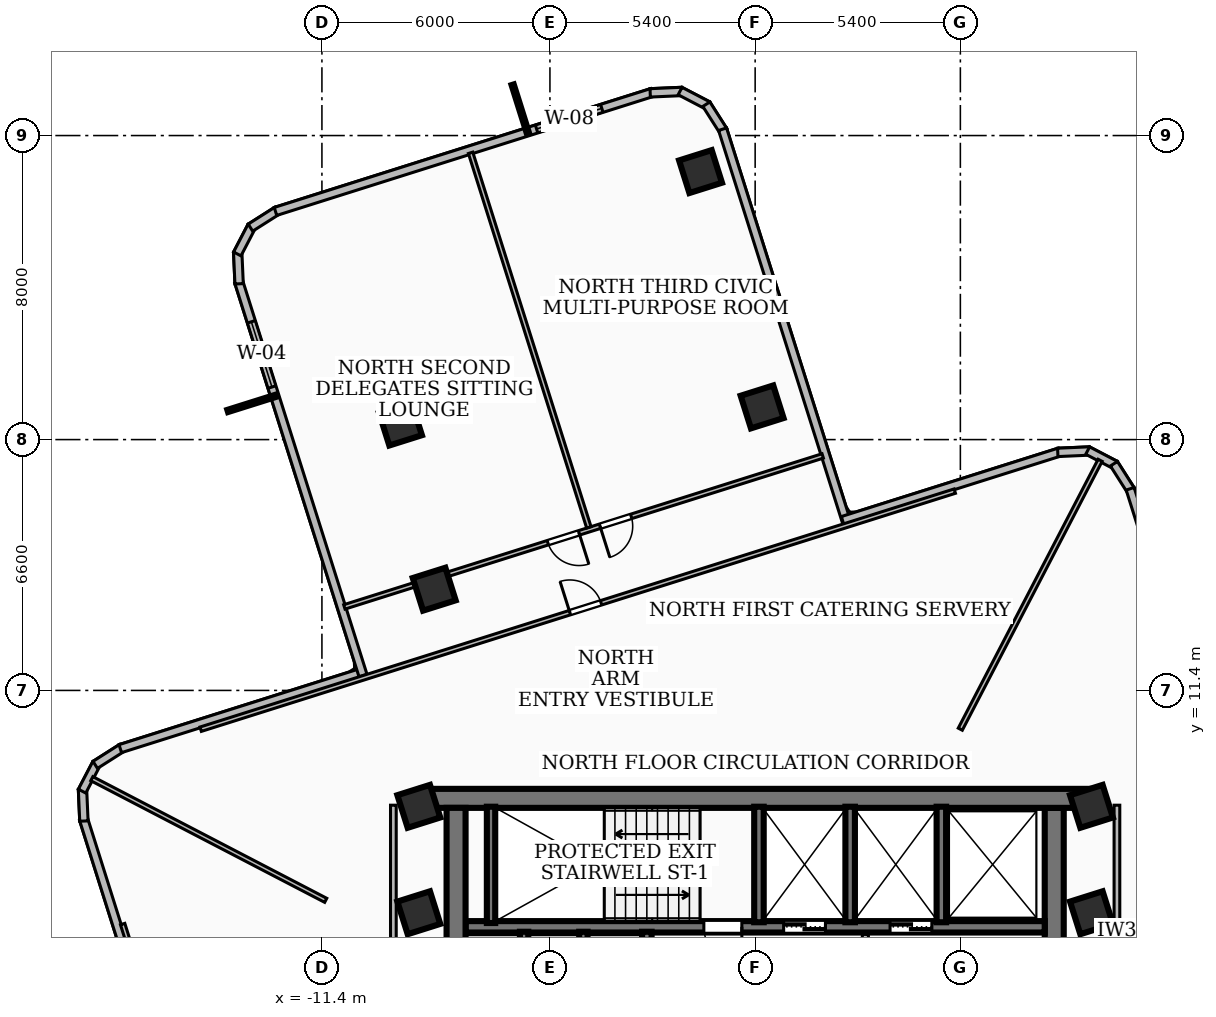
"""IFC4 building model, lengths in metres.
Left out: names, types, materials, properties, quantities, classifications, styles, units other than length and angle.
Written with IfcOpenShell. Run it as: python <this file> out.ifc"""

import sys

from ifc_helpers import new_model, si_unit, direction, frame, frame_2d, origin, origin_2d, place, context, subcontext, project, spatial, rectangle, extrude, element, fill, save


model = new_model("IFC4")
c1 = context("Model", 3, precision=1e-05, world=origin(), true_north=direction((0.0, 1.0)))
c2 = subcontext(c1, "Body", "Model", "MODEL_VIEW")
j1 = project(units=[si_unit("LENGTHUNIT", "METRE"), si_unit("PLANEANGLEUNIT", "RADIAN")], contexts=[c1])
p1 = place(None, origin())
s1 = spatial("IfcSite", under=j1, at=p1, CompositionType="ELEMENT")
p2 = place(p1, origin())
s2 = spatial("IfcBuilding", under=s1, at=p2, CompositionType="ELEMENT")
p3 = place(p2, frame((0.0, 0.0, 152.28)))
s3 = spatial("IfcBuildingStorey", under=s2, at=p3, CompositionType="ELEMENT", Elevation=152.28)
p4 = place(p3, frame((-8.78, 8.56, 0.0), z_axis=(0.0, 0.0, 1.0), x_axis=(1.0, 0.0, 0.0)))
e1 = element("IfcWall", 1, at=p4, inside=s3, PredefinedType="SHEAR", context=c2, shape_type="SweptSolid", body=[
    extrude(rectangle(XDim=17.56, YDim=0.5, at=frame_2d((8.78, 0.0))), origin(), (0.0, 0.0, 1.0), 3.34),
])
for number, where, z_axis, x_axis in (
    (2, (-7.87, 2.0, 0.0), (0.0, 0.0, 1.0), (0.0, 1.0, 0.0)),
    (3, (7.87, 8.31, 0.0), (0.0, 0.0, 1.0), (0.0, -1.0, 0.0)),
):
    element("IfcWall", number, at=place(p3, frame(where, z_axis=z_axis, x_axis=x_axis)), inside=s3, PredefinedType="SHEAR", context=c2, shape_type="SweptSolid", body=[
        extrude(rectangle(XDim=6.31, YDim=0.5, at=frame_2d((3.155, 0.0))), origin(), (0.0, 0.0, 1.0), 3.34),
    ])
p5 = place(p3, frame((7.62, 5.18, 0.0), z_axis=(0.0, 0.0, 1.0), x_axis=(-1.0, 0.0, 0.0)))
e4 = element("IfcWall", 4, at=p5, inside=s3, PredefinedType="SOLIDWALL", context=c2, shape_type="SweptSolid", body=[
    extrude(rectangle(XDim=15.24, YDim=0.3, at=frame_2d((7.62, 0.0))), origin(), (0.0, 0.0, 1.0), 3.34),
])
p6 = place(p5, frame((5.77, 0.0, 0.0)))
e5 = element("IfcOpeningElement", 5, at=p6, cuts=e4, PredefinedType="OPENING", context=c2, shape_type="SweptSolid", body=[
    extrude(rectangle(XDim=1.1, YDim=2.15, at=frame_2d((0.55, 1.075))), frame((0.0, 0.16, 0.0), z_axis=(0.0, -1.0, 0.0), x_axis=(1.0, 0.0, 0.0)), (0.0, 0.0, 1.0), 0.32),
])
p7 = place(p5, frame((2.97, 0.0, 0.0)))
e6 = element("IfcOpeningElement", 6, at=p7, cuts=e4, PredefinedType="OPENING", context=c2, shape_type="SweptSolid", body=[
    extrude(rectangle(XDim=1.1, YDim=2.15, at=frame_2d((0.55, 1.075))), frame((0.0, 0.16, 0.0), z_axis=(0.0, -1.0, 0.0), x_axis=(1.0, 0.0, 0.0)), (0.0, 0.0, 1.0), 0.32),
])
p8 = place(p5, frame((7.97, 0.0, 0.0)))
e7 = element("IfcOpeningElement", 7, at=p8, cuts=e4, PredefinedType="OPENING", context=c2, shape_type="SweptSolid", body=[
    extrude(rectangle(XDim=1.0, YDim=2.1, at=frame_2d((0.5, 1.05))), frame((0.0, 0.16, 0.0), z_axis=(0.0, -1.0, 0.0), x_axis=(1.0, 0.0, 0.0)), (0.0, 0.0, 1.0), 0.32),
])
p9 = place(p3, frame((-6.95, 5.28, 0.0), z_axis=(0.0, 0.0, 1.0), x_axis=(0.0, 1.0, 0.0)))
e8 = element("IfcWall", 8, at=p9, inside=s3, PredefinedType="SOLIDWALL", context=c2, shape_type="SweptSolid", body=[
    extrude(rectangle(XDim=3.06, YDim=0.22, at=frame_2d((1.53, 0.0))), origin(), (0.0, 0.0, 1.0), 3.34),
])
for number, where, z_axis, x_axis in (
    (9, (0.1, 5.3, 0.0), (0.0, 0.0, 1.0), (0.0, 1.0, 0.0)),
    (10, (2.5, 5.3, 0.0), (0.0, 0.0, 1.0), (0.0, 1.0, 0.0)),
    (11, (4.9, 5.3, 0.0), (0.0, 0.0, 1.0), (0.0, 1.0, 0.0)),
):
    element("IfcWall", number, at=place(p3, frame(where, z_axis=z_axis, x_axis=x_axis)), inside=s3, PredefinedType="SOLIDWALL", context=c2, shape_type="SweptSolid", body=[
        extrude(rectangle(XDim=3.04, YDim=0.25, at=frame_2d((1.52, 0.0))), origin(), (0.0, 0.0, 1.0), 3.34),
    ])
p10 = place(p3, frame((-2.85, 1.98, 0.0), z_axis=(0.0, 0.0, 1.0), x_axis=(0.0, 1.0, 0.0)))
e12 = element("IfcWall", 12, at=p10, inside=s3, PredefinedType="SOLIDWALL", context=c2, shape_type="SweptSolid", body=[
    extrude(rectangle(XDim=3.07, YDim=0.25, at=frame_2d((1.535, 0.0))), origin(), (0.0, 0.0, 1.0), 3.34),
])
for number, where, z_axis, x_axis in (
    (13, (-6.08, 1.98, 0.0), (0.0, 0.0, 1.0), (0.0, 1.0, 0.0)),
    (14, (-4.52, 1.98, 0.0), (0.0, 0.0, 1.0), (0.0, 1.0, 0.0)),
):
    element("IfcWall", number, at=place(p3, frame(where, z_axis=z_axis, x_axis=x_axis)), inside=s3, PredefinedType="SOLIDWALL", context=c2, shape_type="SweptSolid", body=[
        extrude(rectangle(XDim=3.07, YDim=0.22, at=frame_2d((1.535, 0.0))), origin(), (0.0, 0.0, 1.0), 3.34),
    ])
for number, where, z_axis, x_axis in (
    (15, (-8.85, 5.55, 0.0), (0.0, 0.0, 1.0), (0.954, 0.301, 0.0)),
    (16, (8.85, 5.55, 0.0), (0.0, 0.0, 1.0), (0.954, 0.301, 0.0)),
    (17, (-8.85, 8.35, 0.0), (0.0, 0.0, 1.0), (0.954, 0.301, 0.0)),
    (18, (8.85, 8.35, 0.0), (0.0, 0.0, 1.0), (0.954, 0.301, 0.0)),
    (19, (0.183, 18.86, 0.0), (0.0, 0.0, 1.0), (0.954, 0.301, 0.0)),
    (20, (-8.445, 14.064, 0.0), (0.0, 0.0, 1.0), (0.954, 0.301, 0.0)),
    (21, (-1.437, 25.052, 0.0), (0.0, 0.0, 1.0), (0.954, 0.301, 0.0)),
    (22, (-9.333, 18.409, 0.0), (0.0, 0.0, 1.0), (0.954, 0.301, 0.0)),
):
    element("IfcColumn", number, at=place(p3, frame(where, z_axis=z_axis, x_axis=x_axis)), inside=s3, PredefinedType="COLUMN", context=c2, shape_type="SweptSolid", body=[
        extrude(rectangle(XDim=0.9, YDim=0.9, at=origin_2d()), origin(), (0.0, 0.0, 1.0), 3.6),
    ])
p11 = place(p3, frame((-15.87, 2.301, 0.0), z_axis=(0.0, 0.0, 1.0), x_axis=(-0.300910882413, 0.953652264112, 0.0)))
e23 = element("IfcWall", 23, at=p11, inside=s3, PredefinedType="SOLIDWALL", context=c2, shape_type="SweptSolid", body=[
    extrude(rectangle(XDim=5.989, YDim=0.22, at=frame_2d((2.994, 0.0))), origin(), (0.0, 0.0, 1.0), 3.34),
])
p12 = place(p3, frame((-17.663, 7.963, 0.0), z_axis=(0.0, 0.0, 1.0), x_axis=(-0.044147725226, 0.99902501388, 0.0)))
e24 = element("IfcWall", 24, at=p12, inside=s3, PredefinedType="SOLIDWALL", context=c2, shape_type="SweptSolid", body=[
    extrude(rectangle(XDim=0.835, YDim=0.22, at=frame_2d((0.417, 0.0))), origin(), (0.0, 0.0, 1.0), 3.34),
])
p13 = place(p3, frame((-17.711, 8.75, 0.0), z_axis=(0.0, 0.0, 1.0), x_axis=(0.462647505427, 0.886542320322, 0.0)))
e25 = element("IfcWall", 25, at=p13, inside=s3, PredefinedType="SOLIDWALL", context=c2, shape_type="SweptSolid", body=[
    extrude(rectangle(XDim=0.819, YDim=0.22, at=frame_2d((0.41, 0.0))), origin(), (0.0, 0.0, 1.0), 3.34),
])
p14 = place(p3, frame((-17.365, 9.441, 0.0), z_axis=(0.0, 0.0, 1.0), x_axis=(0.84369762364, 0.536818702975, 0.0)))
e26 = element("IfcWall", 26, at=p14, inside=s3, PredefinedType="SOLIDWALL", context=c2, shape_type="SweptSolid", body=[
    extrude(rectangle(XDim=0.834, YDim=0.22, at=frame_2d((0.417, 0.0))), origin(), (0.0, 0.0, 1.0), 3.34),
])
p15 = place(p3, frame((-16.706, 9.868, 0.0), z_axis=(0.0, 0.0, 1.0), x_axis=(0.953629605256, 0.300982683852, 0.0)))
e27 = element("IfcWall", 27, at=p15, inside=s3, PredefinedType="SOLIDWALL", context=c2, shape_type="SweptSolid", body=[
    extrude(rectangle(XDim=6.759, YDim=0.22, at=frame_2d((3.379, 0.0))), origin(), (0.0, 0.0, 1.0), 3.34),
])
p16 = place(p3, frame((-10.319, 11.792, 0.0), z_axis=(0.0, 0.0, 1.0), x_axis=(-0.301005479956, 0.953622410096, 0.0)))
e28 = element("IfcWall", 28, at=p16, inside=s3, PredefinedType="SOLIDWALL", context=c2, shape_type="SweptSolid", body=[
    extrude(rectangle(XDim=10.86, YDim=0.22, at=frame_2d((5.43, 0.0))), origin(), (0.0, 0.0, 1.0), 3.34),
])
p17 = place(p16, frame((7.96, 0.0, 0.85)))
e29 = element("IfcOpeningElement", 29, at=p17, cuts=e28, PredefinedType="OPENING", context=c2, shape_type="SweptSolid", body=[
    extrude(rectangle(XDim=1.8, YDim=2.0, at=frame_2d((0.9, 1.0))), frame((0.0, 0.12, 0.0), z_axis=(0.0, -1.0, 0.0), x_axis=(1.0, 0.0, 0.0)), (0.0, 0.0, 1.0), 0.24),
])
p18 = place(p3, frame((-13.579, 22.099, 0.0), z_axis=(0.0, 0.0, 1.0), x_axis=(-0.044225229981, 0.999021585869, 0.0)))
e30 = element("IfcWall", 30, at=p18, inside=s3, PredefinedType="SOLIDWALL", context=c2, shape_type="SweptSolid", body=[
    extrude(rectangle(XDim=0.833, YDim=0.22, at=frame_2d((0.417, 0.0))), origin(), (0.0, 0.0, 1.0), 3.34),
])
p19 = place(p3, frame((-13.627, 22.885, 0.0), z_axis=(0.0, 0.0, 1.0), x_axis=(0.462158884885, 0.886797138652, 0.0)))
e31 = element("IfcWall", 31, at=p19, inside=s3, PredefinedType="SOLIDWALL", context=c2, shape_type="SweptSolid", body=[
    extrude(rectangle(XDim=0.82, YDim=0.22, at=frame_2d((0.41, 0.0))), origin(), (0.0, 0.0, 1.0), 3.34),
])
p20 = place(p3, frame((-13.281, 23.577, 0.0), z_axis=(0.0, 0.0, 1.0), x_axis=(0.844227532803, 0.535984955812, 0.0)))
e32 = element("IfcWall", 32, at=p20, inside=s3, PredefinedType="SOLIDWALL", context=c2, shape_type="SweptSolid", body=[
    extrude(rectangle(XDim=0.834, YDim=0.22, at=frame_2d((0.417, 0.0))), origin(), (0.0, 0.0, 1.0), 3.34),
])
p21 = place(p3, frame((-12.622, 24.003, 0.0), z_axis=(0.0, 0.0, 1.0), x_axis=(0.953584440501, 0.301125745883, 0.0)))
e33 = element("IfcWall", 33, at=p21, inside=s3, PredefinedType="SOLIDWALL", context=c2, shape_type="SweptSolid", body=[
    extrude(rectangle(XDim=10.392, YDim=0.22, at=frame_2d((5.196, 0.0))), origin(), (0.0, 0.0, 1.0), 3.34),
])
p22 = place(p21, frame((7.205, 0.0, 0.85)))
e34 = element("IfcOpeningElement", 34, at=p22, cuts=e33, PredefinedType="OPENING", context=c2, shape_type="SweptSolid", body=[
    extrude(rectangle(XDim=1.8, YDim=1.8, at=frame_2d((0.9, 0.9))), frame((0.0, 0.12, 0.0), z_axis=(0.0, -1.0, 0.0), x_axis=(1.0, 0.0, 0.0)), (0.0, 0.0, 1.0), 0.24),
])
p23 = place(p3, frame((-2.762, 27.123, 0.0), z_axis=(0.0, 0.0, 1.0), x_axis=(0.999024443796, 0.044160623833, 0.0)))
e35 = element("IfcWall", 35, at=p23, inside=s3, PredefinedType="SOLIDWALL", context=c2, shape_type="SweptSolid", body=[
    extrude(rectangle(XDim=0.835, YDim=0.22, at=frame_2d((0.417, 0.0))), origin(), (0.0, 0.0, 1.0), 3.34),
])
p24 = place(p3, frame((-1.975, 27.171, 0.0), z_axis=(0.0, 0.0, 1.0), x_axis=(0.886542320322, -0.462647505427, 0.0)))
e36 = element("IfcWall", 36, at=p24, inside=s3, PredefinedType="SOLIDWALL", context=c2, shape_type="SweptSolid", body=[
    extrude(rectangle(XDim=0.819, YDim=0.22, at=frame_2d((0.41, 0.0))), origin(), (0.0, 0.0, 1.0), 3.34),
])
p25 = place(p3, frame((-1.284, 26.825, 0.0), z_axis=(0.0, 0.0, 1.0), x_axis=(0.537481840432, -0.843275323489, 0.0)))
e37 = element("IfcWall", 37, at=p25, inside=s3, PredefinedType="SOLIDWALL", context=c2, shape_type="SweptSolid", body=[
    extrude(rectangle(XDim=0.833, YDim=0.22, at=frame_2d((0.417, 0.0))), origin(), (0.0, 0.0, 1.0), 3.34),
])
p26 = place(p3, frame((-0.857, 26.167, 0.0), z_axis=(0.0, 0.0, 1.0), x_axis=(0.300949507539, -0.953640075664, 0.0)))
e38 = element("IfcWall", 38, at=p26, inside=s3, PredefinedType="SOLIDWALL", context=c2, shape_type="SweptSolid", body=[
    extrude(rectangle(XDim=10.858, YDim=0.22, at=frame_2d((5.429, 0.0))), origin(), (0.0, 0.0, 1.0), 2.152),
])
p27 = place(p3, frame((2.301, 15.87, 0.0), z_axis=(0.0, 0.0, 1.0), x_axis=(0.953652264112, 0.300910882413, 0.0)))
e39 = element("IfcWall", 39, at=p27, inside=s3, PredefinedType="SOLIDWALL", context=c2, shape_type="SweptSolid", body=[
    extrude(rectangle(XDim=5.989, YDim=0.22, at=frame_2d((2.994, 0.0))), origin(), (0.0, 0.0, 1.0), 2.152),
])
p28 = place(p3, frame((7.963, 17.663, 0.0), z_axis=(0.0, 0.0, 1.0), x_axis=(0.99902501388, 0.044147725226, 0.0)))
e40 = element("IfcWall", 40, at=p28, inside=s3, PredefinedType="SOLIDWALL", context=c2, shape_type="SweptSolid", body=[
    extrude(rectangle(XDim=0.835, YDim=0.22, at=frame_2d((0.417, 0.0))), origin(), (0.0, 0.0, 1.0), 3.34),
])
p29 = place(p3, frame((8.75, 17.711, 0.0), z_axis=(0.0, 0.0, 1.0), x_axis=(0.886542320322, -0.462647505427, 0.0)))
e41 = element("IfcWall", 41, at=p29, inside=s3, PredefinedType="SOLIDWALL", context=c2, shape_type="SweptSolid", body=[
    extrude(rectangle(XDim=0.819, YDim=0.22, at=frame_2d((0.41, 0.0))), origin(), (0.0, 0.0, 1.0), 3.34),
])
p30 = place(p3, frame((9.441, 17.365, 0.0), z_axis=(0.0, 0.0, 1.0), x_axis=(0.536818702975, -0.84369762364, 0.0)))
e42 = element("IfcWall", 42, at=p30, inside=s3, PredefinedType="SOLIDWALL", context=c2, shape_type="SweptSolid", body=[
    extrude(rectangle(XDim=0.834, YDim=0.22, at=frame_2d((0.417, 0.0))), origin(), (0.0, 0.0, 1.0), 3.34),
])
p31 = place(p3, frame((9.868, 16.706, 0.0), z_axis=(0.0, 0.0, 1.0), x_axis=(0.300982683852, -0.953629605256, 0.0)))
e43 = element("IfcWall", 43, at=p31, inside=s3, PredefinedType="SOLIDWALL", context=c2, shape_type="SweptSolid", body=[
    extrude(rectangle(XDim=6.759, YDim=0.22, at=frame_2d((3.379, 0.0))), origin(), (0.0, 0.0, 1.0), 2.152),
])
p32 = place(p3, frame((2.9, 2.04, 0.0), z_axis=(0.0, 0.0, 1.0), x_axis=(0.0, 1.0, 0.0)))
e44 = element("IfcWall", 44, at=p32, inside=s3, PredefinedType="PARTITIONING", context=c2, shape_type="SweptSolid", body=[
    extrude(rectangle(XDim=2.94, YDim=0.16, at=frame_2d((1.47, 0.0))), origin(), (0.0, 0.0, 1.0), 2.57),
])
p33 = place(p32, frame((1.82, 0.0, 0.0)))
e45 = element("IfcOpeningElement", 45, at=p33, cuts=e44, PredefinedType="OPENING", context=c2, shape_type="SweptSolid", body=[
    extrude(rectangle(XDim=0.9, YDim=2.06, at=frame_2d((0.45, 1.03))), frame((0.0, 0.09, 0.0), z_axis=(0.0, -1.0, 0.0), x_axis=(1.0, 0.0, 0.0)), (0.0, 0.0, 1.0), 0.18),
])
for number, where, z_axis, x_axis in (
    (46, (-9.52, 1.75, 0.0), (0.0, 0.0, 1.0), (0.0, 1.0, 0.0)),
    (47, (9.52, 1.75, 0.0), (0.0, 0.0, 1.0), (0.0, 1.0, 0.0)),
):
    element("IfcWall", number, at=place(p3, frame(where, z_axis=z_axis, x_axis=x_axis)), inside=s3, PredefinedType="PARTITIONING", context=c2, shape_type="SweptSolid", body=[
        extrude(rectangle(XDim=6.63, YDim=0.15, at=frame_2d((3.315, 0.0))), origin(), (0.0, 0.0, 1.0), 2.152),
    ])
p34 = place(p3, frame((5.398, 10.38, 0.0), z_axis=(0.0, 0.0, 1.0), x_axis=(0.461434665806, 0.887174193263, 0.0)))
e48 = element("IfcWall", 48, at=p34, inside=s3, PredefinedType="PARTITIONING", context=c2, shape_type="SweptSolid", body=[
    extrude(rectangle(XDim=7.975, YDim=0.12, at=frame_2d((3.988, 0.0))), origin(), (0.0, 0.0, 1.0), 2.152),
])
p35 = place(p3, frame((-11.3, 5.877, 0.0), z_axis=(0.0, 0.0, 1.0), x_axis=(-0.887198362964, 0.461388193123, 0.0)))
e49 = element("IfcWall", 49, at=p35, inside=s3, PredefinedType="PARTITIONING", context=c2, shape_type="SweptSolid", body=[
    extrude(rectangle(XDim=6.938, YDim=0.12, at=frame_2d((3.469, 0.0))), origin(), (0.0, 0.0, 1.0), 3.34),
])
p36 = place(p3, frame((-14.591, 10.379, 0.0), z_axis=(0.0, 0.0, 1.0), x_axis=(0.95360181293, 0.301070726534, 0.0)))
e50 = element("IfcWall", 50, at=p36, inside=s3, PredefinedType="PARTITIONING", context=c2, shape_type="SweptSolid", body=[
    extrude(rectangle(XDim=20.81, YDim=0.12, at=frame_2d((10.405, 0.0))), origin(), (0.0, 0.0, 1.0), 2.152),
])
p37 = place(p36, frame((10.189, 0.0, 0.0)))
e51 = element("IfcOpeningElement", 51, at=p37, cuts=e50, PredefinedType="OPENING", context=c2, shape_type="SweptSolid", body=[
    extrude(rectangle(XDim=0.86, YDim=2.0, at=frame_2d((0.43, 1.0))), frame((0.0, 0.07, 0.0), z_axis=(0.0, -1.0, 0.0), x_axis=(1.0, 0.0, 0.0)), (0.0, 0.0, 1.0), 0.14),
])
p38 = place(p3, frame((-4.376, 15.69, 0.0), z_axis=(0.0, 0.0, 1.0), x_axis=(-0.301100844528, 0.953592303568, 0.0)))
e52 = element("IfcWall", 52, at=p38, inside=s3, PredefinedType="PARTITIONING", context=c2, shape_type="SweptSolid", body=[
    extrude(rectangle(XDim=10.336, YDim=0.12, at=frame_2d((5.168, 0.0))), origin(), (0.0, 0.0, 1.0), 2.152),
])
p39 = place(p3, frame((1.778, 17.57, 0.0), z_axis=(0.0, 0.0, 1.0), x_axis=(-0.953627378356, -0.300989739442, 0.0)))
e53 = element("IfcWall", 53, at=p39, inside=s3, PredefinedType="PARTITIONING", context=c2, shape_type="SweptSolid", body=[
    extrude(rectangle(XDim=13.2, YDim=0.12, at=frame_2d((6.6, 0.0))), origin(), (0.0, 0.0, 1.0), 2.072),
])
p40 = place(p39, frame((5.285, 0.0, 0.0)))
e54 = element("IfcOpeningElement", 54, at=p40, cuts=e53, PredefinedType="OPENING", context=c2, shape_type="SweptSolid", body=[
    extrude(rectangle(XDim=0.86, YDim=2.0, at=frame_2d((0.43, 1.0))), frame((0.0, 0.07, 0.0), z_axis=(0.0, -1.0, 0.0), x_axis=(1.0, 0.0, 0.0)), (0.0, 0.0, 1.0), 0.14),
])
p41 = place(p39, frame((6.725, 0.0, 0.0)))
e55 = element("IfcOpeningElement", 55, at=p41, cuts=e53, PredefinedType="OPENING", context=c2, shape_type="SweptSolid", body=[
    extrude(rectangle(XDim=0.86, YDim=2.0, at=frame_2d((0.43, 1.0))), frame((0.0, 0.07, 0.0), z_axis=(0.0, -1.0, 0.0), x_axis=(1.0, 0.0, 0.0)), (0.0, 0.0, 1.0), 0.14),
])
p42 = place(p3, frame((-10.379, -14.591, 0.0), z_axis=(0.0, 0.0, 1.0), x_axis=(-0.301070726534, 0.95360181293, 0.0)))
e56 = element("IfcWall", 56, at=p42, inside=s3, PredefinedType="PARTITIONING", context=c2, shape_type="SweptSolid", body=[
    extrude(rectangle(XDim=20.81, YDim=0.12, at=frame_2d((10.405, 0.0))), origin(), (0.0, 0.0, 1.0), 2.152),
])
p43 = place(p42, frame((10.189, 0.0, 0.0)))
e57 = element("IfcOpeningElement", 57, at=p43, cuts=e56, PredefinedType="OPENING", context=c2, shape_type="SweptSolid", body=[
    extrude(rectangle(XDim=0.86, YDim=2.0, at=frame_2d((0.43, 1.0))), frame((0.0, 0.07, 0.0), z_axis=(0.0, -1.0, 0.0), x_axis=(1.0, 0.0, 0.0)), (0.0, 0.0, 1.0), 0.14),
])
p44 = place(p17, origin())
e58 = element("IfcWindow", 58, at=p44, inside=s3, PartitioningType="SINGLE_PANEL", PredefinedType="WINDOW", context=c2, shape_type="SweptSolid", body=[
    extrude(rectangle(XDim=1.8, YDim=2.0, at=frame_2d((0.9, 1.0))), frame((0.0, 0.03, 0.0), z_axis=(0.0, -1.0, 0.0), x_axis=(1.0, 0.0, 0.0)), (0.0, 0.0, 1.0), 0.06),
])
fill(e29, e58)
p45 = place(p22, origin())
e59 = element("IfcWindow", 59, at=p45, inside=s3, PartitioningType="SINGLE_PANEL", PredefinedType="WINDOW", context=c2, shape_type="SweptSolid", body=[
    extrude(rectangle(XDim=1.8, YDim=1.8, at=frame_2d((0.9, 0.9))), frame((0.0, 0.03, 0.0), z_axis=(0.0, -1.0, 0.0), x_axis=(1.0, 0.0, 0.0)), (0.0, 0.0, 1.0), 0.06),
])
fill(e34, e59)
p46 = place(p6, origin())
e60 = element("IfcDoor", 60, at=p46, inside=s3, OperationType="DOUBLE_DOOR_SLIDING", PredefinedType="DOOR", context=c2, shape_type="SweptSolid", body=[
    extrude(rectangle(XDim=1.1, YDim=2.15, at=frame_2d((0.55, 1.075))), frame((0.0, 0.025, 0.0), z_axis=(0.0, -1.0, 0.0), x_axis=(1.0, 0.0, 0.0)), (0.0, 0.0, 1.0), 0.05),
])
fill(e5, e60)
p47 = place(p7, origin())
e61 = element("IfcDoor", 61, at=p47, inside=s3, OperationType="DOUBLE_DOOR_SLIDING", PredefinedType="DOOR", context=c2, shape_type="SweptSolid", body=[
    extrude(rectangle(XDim=1.1, YDim=2.15, at=frame_2d((0.55, 1.075))), frame((0.0, 0.025, 0.0), z_axis=(0.0, -1.0, 0.0), x_axis=(1.0, 0.0, 0.0)), (0.0, 0.0, 1.0), 0.05),
])
fill(e6, e61)
p48 = place(p8, origin())
e62 = element("IfcDoor", 62, at=p48, inside=s3, OperationType="SINGLE_SWING_LEFT", PredefinedType="DOOR", context=c2, shape_type="SweptSolid", body=[
    extrude(rectangle(XDim=1.0, YDim=2.1, at=frame_2d((0.5, 1.05))), frame((0.0, 0.025, 0.0), z_axis=(0.0, -1.0, 0.0), x_axis=(1.0, 0.0, 0.0)), (0.0, 0.0, 1.0), 0.05),
])
fill(e7, e62)
p49 = place(p37, origin())
e63 = element("IfcDoor", 63, at=p49, inside=s3, OperationType="SINGLE_SWING_LEFT", PredefinedType="DOOR", context=c2, shape_type="SweptSolid", body=[
    extrude(rectangle(XDim=0.86, YDim=2.0, at=frame_2d((0.43, 1.0))), frame((0.0, 0.025, 0.0), z_axis=(0.0, -1.0, 0.0), x_axis=(1.0, 0.0, 0.0)), (0.0, 0.0, 1.0), 0.05),
])
fill(e51, e63)
p50 = place(p40, origin())
e64 = element("IfcDoor", 64, at=p50, inside=s3, OperationType="SINGLE_SWING_RIGHT", PredefinedType="DOOR", context=c2, shape_type="SweptSolid", body=[
    extrude(rectangle(XDim=0.86, YDim=2.0, at=frame_2d((0.43, 1.0))), frame((0.0, 0.025, 0.0), z_axis=(0.0, -1.0, 0.0), x_axis=(1.0, 0.0, 0.0)), (0.0, 0.0, 1.0), 0.05),
])
fill(e54, e64)
p51 = place(p41, origin())
e65 = element("IfcDoor", 65, at=p51, inside=s3, OperationType="SINGLE_SWING_LEFT", PredefinedType="DOOR", context=c2, shape_type="SweptSolid", body=[
    extrude(rectangle(XDim=0.86, YDim=2.0, at=frame_2d((0.43, 1.0))), frame((0.0, 0.025, 0.0), z_axis=(0.0, -1.0, 0.0), x_axis=(1.0, 0.0, 0.0)), (0.0, 0.0, 1.0), 0.05),
])
fill(e55, e65)
save(model, sys.argv[1])
